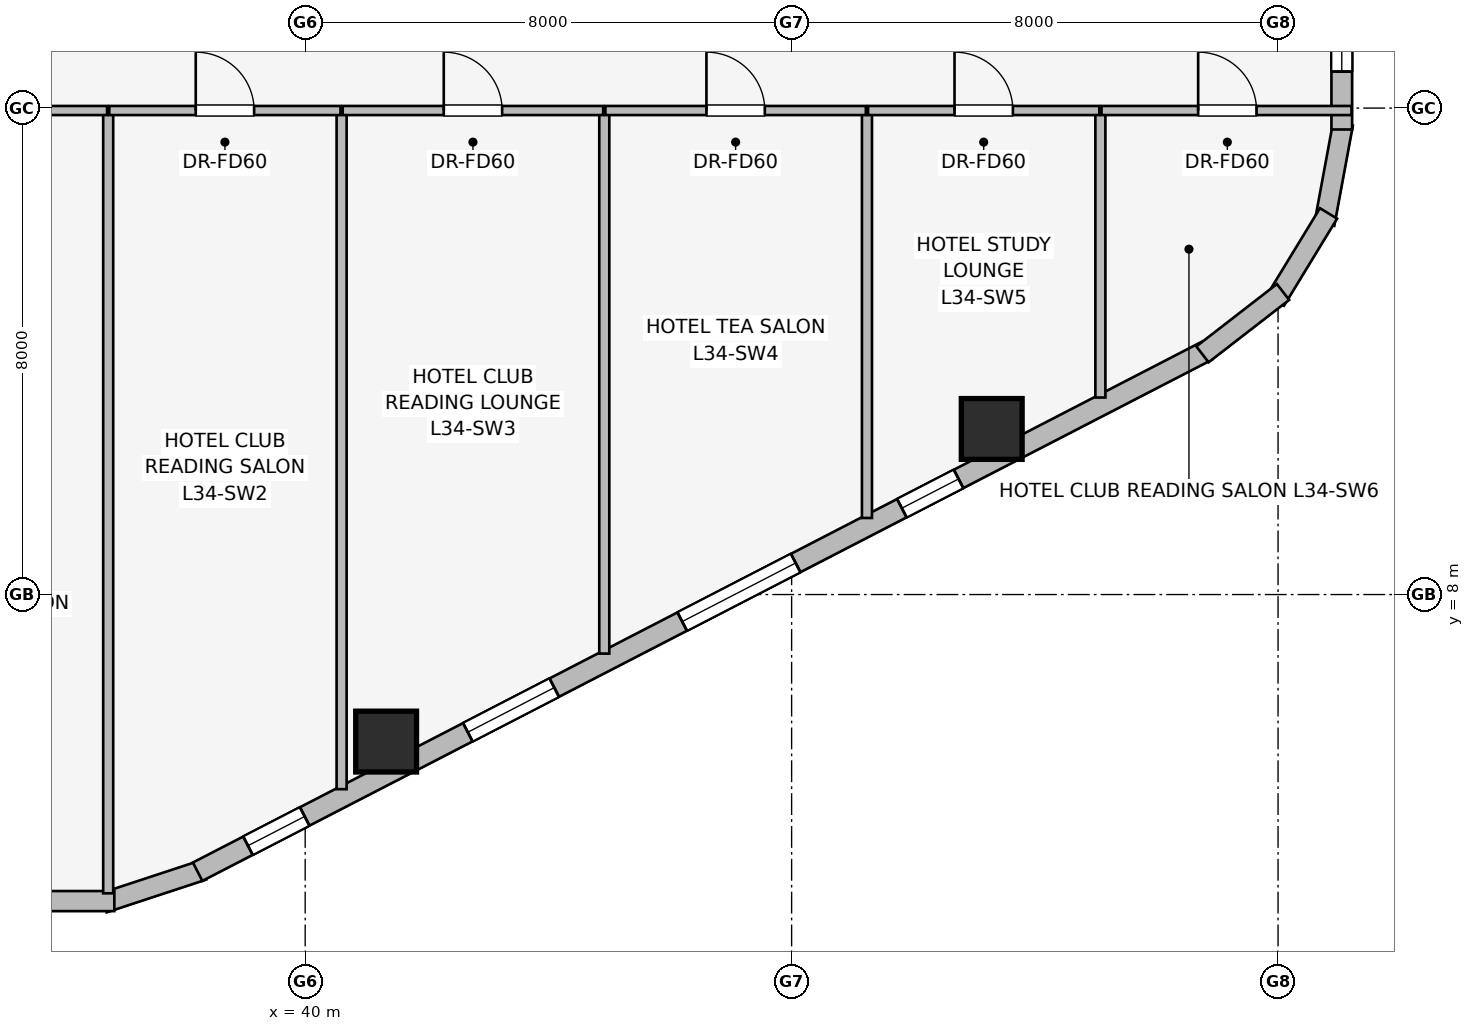
"""IFC4 building model, lengths in metres.
Left out: names, types, materials, properties, quantities, classifications, styles, units other than length and angle.
Written with IfcOpenShell. Run it as: python <this file> out.ifc"""

import sys

from ifc_helpers import new_model, si_unit, direction, frame, frame_2d, origin, origin_2d, place, context, subcontext, project, spatial, rectangle, extrude, element, fill, save


model = new_model("IFC4")
c1 = context("Model", 3, precision=1e-05, world=origin(), true_north=direction((0.0, 1.0)))
c2 = subcontext(c1, "Body", "Model", "MODEL_VIEW")
j1 = project(units=[si_unit("LENGTHUNIT", "METRE"), si_unit("PLANEANGLEUNIT", "RADIAN")], contexts=[c1])
p1 = place(None, origin())
s1 = spatial("IfcSite", under=j1, at=p1, CompositionType="ELEMENT")
p2 = place(p1, origin())
s2 = spatial("IfcBuilding", under=s1, at=p2, CompositionType="ELEMENT")
p3 = place(p2, frame((0.0, 0.0, 129.15)))
s3 = spatial("IfcBuildingStorey", under=s2, at=p3, CompositionType="ELEMENT", Elevation=129.15)
for number, where, z_axis, x_axis in (
    (1, (41.331, 5.582, 0.0), (0.0, 0.0, 1.0), (1.0, 0.0, 0.0)),
    (2, (51.291, 10.723, 0.0), (0.0, 0.0, 1.0), (1.0, 0.0, 0.0)),
):
    element("IfcColumn", number, at=place(p3, frame(where, z_axis=z_axis, x_axis=x_axis)), inside=s3, PredefinedType="COLUMN", context=c2, shape_type="SweptSolid", body=[
        extrude(rectangle(XDim=1.0, YDim=1.0, at=origin_2d()), origin(), (0.0, 0.0, 1.0), 3.45),
    ])
for number, where, z_axis, x_axis in (
    (3, (38.319, 3.468, 0.0), (0.0, 0.0, 1.0), (-0.95, -0.312, 0.0)),
    (4, (36.861, 2.959, 0.0), (0.0, 0.0, 1.0), (-1.0, 0.0, 0.0)),
):
    element("IfcWall", number, at=place(p3, frame(where, z_axis=z_axis, x_axis=x_axis)), inside=s3, PredefinedType="STANDARD", context=c2, shape_type="SweptSolid", body=[
        extrude(rectangle(XDim=1.722, YDim=0.33, at=frame_2d((0.861, 0.0))), origin(), (0.0, 0.0, 1.0), 3.19),
    ])
p4 = place(p3, frame((54.831, 12.01, 0.0), z_axis=(0.0, 0.0, 1.0), x_axis=(-0.888613612362, -0.458656568606, 0.0)))
e5 = element("IfcWall", 5, at=p4, inside=s3, PredefinedType="STANDARD", context=c2, shape_type="SweptSolid", body=[
    extrude(rectangle(XDim=18.681, YDim=0.34, at=frame_2d((9.34, 0.0))), origin(), (0.0, 0.0, 1.0), 3.19),
])
p5 = place(p4, frame((4.597, 0.0, 0.75)))
e6 = element("IfcOpeningElement", 6, at=p5, cuts=e5, PredefinedType="OPENING", context=c2, shape_type="SweptSolid", body=[
    extrude(rectangle(XDim=1.05, YDim=1.4, at=frame_2d((0.525, 0.7))), frame((0.0, 0.18, 0.0), z_axis=(0.0, -1.0, 0.0), x_axis=(1.0, 0.0, 0.0)), (0.0, 0.0, 1.0), 0.36),
])
p6 = place(p4, frame((7.612, 0.0, 0.75)))
e7 = element("IfcOpeningElement", 7, at=p6, cuts=e5, PredefinedType="OPENING", context=c2, shape_type="SweptSolid", body=[
    extrude(rectangle(XDim=2.1, YDim=1.5, at=frame_2d((1.05, 0.75))), frame((0.0, 0.18, 0.0), z_axis=(0.0, -1.0, 0.0), x_axis=(1.0, 0.0, 0.0)), (0.0, 0.0, 1.0), 0.36),
])
p7 = place(p4, frame((12.08, 0.0, 0.75)))
e8 = element("IfcOpeningElement", 8, at=p7, cuts=e5, PredefinedType="OPENING", context=c2, shape_type="SweptSolid", body=[
    extrude(rectangle(XDim=1.6, YDim=1.55, at=frame_2d((0.8, 0.775))), frame((0.0, 0.18, 0.0), z_axis=(0.0, -1.0, 0.0), x_axis=(1.0, 0.0, 0.0)), (0.0, 0.0, 1.0), 0.36),
])
p8 = place(p4, frame((16.699, 0.0, 0.75)))
e9 = element("IfcOpeningElement", 9, at=p8, cuts=e5, PredefinedType="OPENING", context=c2, shape_type="SweptSolid", body=[
    extrude(rectangle(XDim=1.05, YDim=1.4, at=frame_2d((0.525, 0.7))), frame((0.0, 0.18, 0.0), z_axis=(0.0, -1.0, 0.0), x_axis=(1.0, 0.0, 0.0)), (0.0, 0.0, 1.0), 0.36),
])
p9 = place(p3, frame((57.068, 15.742, 0.0), z_axis=(0.0, 0.0, 1.0), x_axis=(-0.181984991895, -0.983301308209, 0.0)))
e10 = element("IfcWall", 10, at=p9, inside=s3, PredefinedType="STANDARD", context=c2, shape_type="SweptSolid", body=[
    extrude(rectangle(XDim=1.677, YDim=0.33, at=frame_2d((0.838, 0.0))), origin(), (0.0, 0.0, 1.0), 3.19),
])
p10 = place(p3, frame((56.83, 14.268, 0.0), z_axis=(0.0, 0.0, 1.0), x_axis=(-0.520519429557, -0.853849824883, 0.0)))
e11 = element("IfcWall", 11, at=p10, inside=s3, PredefinedType="STANDARD", context=c2, shape_type="SweptSolid", body=[
    extrude(rectangle(XDim=1.677, YDim=0.33, at=frame_2d((0.839, 0.0))), origin(), (0.0, 0.0, 1.0), 3.19),
])
p11 = place(p3, frame((56.082, 12.976, 0.0), z_axis=(0.0, 0.0, 1.0), x_axis=(-0.790621329885, -0.612305408053, 0.0)))
e12 = element("IfcWall", 12, at=p11, inside=s3, PredefinedType="STANDARD", context=c2, shape_type="SweptSolid", body=[
    extrude(rectangle(XDim=1.676, YDim=0.33, at=frame_2d((0.838, 0.0))), origin(), (0.0, 0.0, 1.0), 3.19),
])
p12 = place(p3, frame((57.048, 32.352, 0.0), z_axis=(0.0, 0.0, 1.0), x_axis=(0.0, -1.0, 0.0)))
e13 = element("IfcWall", 13, at=p12, inside=s3, PredefinedType="STANDARD", context=c2, shape_type="SweptSolid", body=[
    extrude(rectangle(XDim=16.704, YDim=0.34, at=frame_2d((8.352, 0.0))), origin(), (0.0, 0.0, 1.0), 3.19),
])
p13 = place(p12, frame((0.992, 0.0, 0.75)))
e14 = element("IfcOpeningElement", 14, at=p13, cuts=e13, PredefinedType="OPENING", context=c2, shape_type="SweptSolid", body=[
    extrude(rectangle(XDim=1.05, YDim=1.4, at=frame_2d((0.525, 0.7))), frame((0.0, 0.18, 0.0), z_axis=(0.0, -1.0, 0.0), x_axis=(1.0, 0.0, 0.0)), (0.0, 0.0, 1.0), 0.36),
])
p14 = place(p12, frame((4.935, 0.0, 0.75)))
e15 = element("IfcOpeningElement", 15, at=p14, cuts=e13, PredefinedType="OPENING", context=c2, shape_type="SweptSolid", body=[
    extrude(rectangle(XDim=2.1, YDim=1.5, at=frame_2d((1.05, 0.75))), frame((0.0, 0.18, 0.0), z_axis=(0.0, -1.0, 0.0), x_axis=(1.0, 0.0, 0.0)), (0.0, 0.0, 1.0), 0.36),
])
p15 = place(p12, frame((9.919, 0.0, 0.75)))
e16 = element("IfcOpeningElement", 16, at=p15, cuts=e13, PredefinedType="OPENING", context=c2, shape_type="SweptSolid", body=[
    extrude(rectangle(XDim=1.6, YDim=1.55, at=frame_2d((0.8, 0.775))), frame((0.0, 0.18, 0.0), z_axis=(0.0, -1.0, 0.0), x_axis=(1.0, 0.0, 0.0)), (0.0, 0.0, 1.0), 0.36),
])
p16 = place(p12, frame((14.702, 0.0, 0.75)))
e17 = element("IfcOpeningElement", 17, at=p16, cuts=e13, PredefinedType="OPENING", context=c2, shape_type="SweptSolid", body=[
    extrude(rectangle(XDim=1.05, YDim=1.4, at=frame_2d((0.525, 0.7))), frame((0.0, 0.18, 0.0), z_axis=(0.0, -1.0, 0.0), x_axis=(1.0, 0.0, 0.0)), (0.0, 0.0, 1.0), 0.36),
])
p17 = place(p3, frame((36.76, 3.087, 0.0), z_axis=(0.0, 0.0, 1.0), x_axis=(0.0, 1.0, 0.0)))
e18 = element("IfcWall", 18, at=p17, inside=s3, PredefinedType="PARTITIONING", context=c2, shape_type="SweptSolid", body=[
    extrude(rectangle(XDim=12.843, YDim=0.165, at=frame_2d((6.421, 0.0))), origin(), (0.0, 0.0, 1.0), 3.19),
])
p18 = place(p3, frame((40.599, 4.799, 0.0), z_axis=(0.0, 0.0, 1.0), x_axis=(0.0, 1.0, 0.0)))
e19 = element("IfcWall", 19, at=p18, inside=s3, PredefinedType="PARTITIONING", context=c2, shape_type="SweptSolid", body=[
    extrude(rectangle(XDim=11.131, YDim=0.165, at=frame_2d((5.565, 0.0))), origin(), (0.0, 0.0, 1.0), 2.42),
])
p19 = place(p3, frame((44.919, 7.029, 0.0), z_axis=(0.0, 0.0, 1.0), x_axis=(0.0, 1.0, 0.0)))
e20 = element("IfcWall", 20, at=p19, inside=s3, PredefinedType="PARTITIONING", context=c2, shape_type="SweptSolid", body=[
    extrude(rectangle(XDim=8.901, YDim=0.165, at=frame_2d((4.45, 0.0))), origin(), (0.0, 0.0, 1.0), 3.19),
])
p20 = place(p3, frame((49.239, 9.259, 0.0), z_axis=(0.0, 0.0, 1.0), x_axis=(0.0, 1.0, 0.0)))
e21 = element("IfcWall", 21, at=p20, inside=s3, PredefinedType="PARTITIONING", context=c2, shape_type="SweptSolid", body=[
    extrude(rectangle(XDim=6.671, YDim=0.165, at=frame_2d((3.335, 0.0))), origin(), (0.0, 0.0, 1.0), 3.19),
])
p21 = place(p3, frame((53.078, 11.24, 0.0), z_axis=(0.0, 0.0, 1.0), x_axis=(0.0, 1.0, 0.0)))
e22 = element("IfcWall", 22, at=p21, inside=s3, PredefinedType="PARTITIONING", context=c2, shape_type="SweptSolid", body=[
    extrude(rectangle(XDim=4.69, YDim=0.165, at=frame_2d((2.345, 0.0))), origin(), (0.0, 0.0, 1.0), 3.19),
])
p22 = place(p3, frame((32.85, 15.96, 0.0), z_axis=(0.0, 0.0, 1.0), x_axis=(1.0, 0.0, 0.0)))
e23 = element("IfcWall", 23, at=p22, inside=s3, PredefinedType="PARTITIONING", context=c2, shape_type="SweptSolid", body=[
    extrude(rectangle(XDim=3.892, YDim=0.15, at=frame_2d((1.946, 0.0))), origin(), (0.0, 0.0, 1.0), 3.19),
])
p23 = place(p22, frame((1.466, 0.0, 0.0)))
e24 = element("IfcOpeningElement", 24, at=p23, cuts=e23, PredefinedType="OPENING", context=c2, shape_type="SweptSolid", body=[
    extrude(rectangle(XDim=0.96, YDim=2.0, at=frame_2d((0.48, 1.0))), frame((0.0, 0.085, 0.0), z_axis=(0.0, -1.0, 0.0), x_axis=(1.0, 0.0, 0.0)), (0.0, 0.0, 1.0), 0.17),
])
p24 = place(p3, frame((36.778, 15.96, 0.0), z_axis=(0.0, 0.0, 1.0), x_axis=(1.0, 0.0, 0.0)))
e25 = element("IfcWall", 25, at=p24, inside=s3, PredefinedType="PARTITIONING", context=c2, shape_type="SweptSolid", body=[
    extrude(rectangle(XDim=3.803, YDim=0.15, at=frame_2d((1.901, 0.0))), origin(), (0.0, 0.0, 1.0), 3.19),
])
p25 = place(p24, frame((1.422, 0.0, 0.0)))
e26 = element("IfcOpeningElement", 26, at=p25, cuts=e25, PredefinedType="OPENING", context=c2, shape_type="SweptSolid", body=[
    extrude(rectangle(XDim=0.96, YDim=2.0, at=frame_2d((0.48, 1.0))), frame((0.0, 0.085, 0.0), z_axis=(0.0, -1.0, 0.0), x_axis=(1.0, 0.0, 0.0)), (0.0, 0.0, 1.0), 0.17),
])
p26 = place(p3, frame((40.617, 15.96, 0.0), z_axis=(0.0, 0.0, 1.0), x_axis=(1.0, 0.0, 0.0)))
e27 = element("IfcWall", 27, at=p26, inside=s3, PredefinedType="PARTITIONING", context=c2, shape_type="SweptSolid", body=[
    extrude(rectangle(XDim=4.284, YDim=0.15, at=frame_2d((2.142, 0.0))), origin(), (0.0, 0.0, 1.0), 3.19),
])
p27 = place(p26, frame((1.662, 0.0, 0.0)))
e28 = element("IfcOpeningElement", 28, at=p27, cuts=e27, PredefinedType="OPENING", context=c2, shape_type="SweptSolid", body=[
    extrude(rectangle(XDim=0.96, YDim=2.0, at=frame_2d((0.48, 1.0))), frame((0.0, 0.085, 0.0), z_axis=(0.0, -1.0, 0.0), x_axis=(1.0, 0.0, 0.0)), (0.0, 0.0, 1.0), 0.17),
])
p28 = place(p3, frame((44.937, 15.96, 0.0), z_axis=(0.0, 0.0, 1.0), x_axis=(1.0, 0.0, 0.0)))
e29 = element("IfcWall", 29, at=p28, inside=s3, PredefinedType="PARTITIONING", context=c2, shape_type="SweptSolid", body=[
    extrude(rectangle(XDim=4.284, YDim=0.15, at=frame_2d((2.142, 0.0))), origin(), (0.0, 0.0, 1.0), 3.19),
])
p29 = place(p28, frame((1.662, 0.0, 0.0)))
e30 = element("IfcOpeningElement", 30, at=p29, cuts=e29, PredefinedType="OPENING", context=c2, shape_type="SweptSolid", body=[
    extrude(rectangle(XDim=0.96, YDim=2.0, at=frame_2d((0.48, 1.0))), frame((0.0, 0.085, 0.0), z_axis=(0.0, -1.0, 0.0), x_axis=(1.0, 0.0, 0.0)), (0.0, 0.0, 1.0), 0.17),
])
p30 = place(p3, frame((49.257, 15.96, 0.0), z_axis=(0.0, 0.0, 1.0), x_axis=(1.0, 0.0, 0.0)))
e31 = element("IfcWall", 31, at=p30, inside=s3, PredefinedType="PARTITIONING", context=c2, shape_type="SweptSolid", body=[
    extrude(rectangle(XDim=3.803, YDim=0.15, at=frame_2d((1.901, 0.0))), origin(), (0.0, 0.0, 1.0), 3.19),
])
p31 = place(p30, frame((1.422, 0.0, 0.0)))
e32 = element("IfcOpeningElement", 32, at=p31, cuts=e31, PredefinedType="OPENING", context=c2, shape_type="SweptSolid", body=[
    extrude(rectangle(XDim=0.96, YDim=2.0, at=frame_2d((0.48, 1.0))), frame((0.0, 0.085, 0.0), z_axis=(0.0, -1.0, 0.0), x_axis=(1.0, 0.0, 0.0)), (0.0, 0.0, 1.0), 0.17),
])
p32 = place(p3, frame((53.096, 15.96, 0.0), z_axis=(0.0, 0.0, 1.0), x_axis=(1.0, 0.0, 0.0)))
e33 = element("IfcWall", 33, at=p32, inside=s3, PredefinedType="PARTITIONING", context=c2, shape_type="SweptSolid", body=[
    extrude(rectangle(XDim=4.112, YDim=0.15, at=frame_2d((2.056, 0.0))), origin(), (0.0, 0.0, 1.0), 3.19),
])
p33 = place(p32, frame((1.59, 0.0, 0.0)))
e34 = element("IfcOpeningElement", 34, at=p33, cuts=e33, PredefinedType="OPENING", context=c2, shape_type="SweptSolid", body=[
    extrude(rectangle(XDim=0.96, YDim=2.0, at=frame_2d((0.48, 1.0))), frame((0.0, 0.085, 0.0), z_axis=(0.0, -1.0, 0.0), x_axis=(1.0, 0.0, 0.0)), (0.0, 0.0, 1.0), 0.17),
])
p34 = place(p5, origin())
e35 = element("IfcWindow", 35, at=p34, inside=s3, PartitioningType="SINGLE_PANEL", PredefinedType="WINDOW", context=c2, shape_type="SweptSolid", body=[
    extrude(rectangle(XDim=1.05, YDim=1.4, at=frame_2d((0.525, 0.7))), frame((0.0, 0.03, 0.0), z_axis=(0.0, -1.0, 0.0), x_axis=(1.0, 0.0, 0.0)), (0.0, 0.0, 1.0), 0.06),
])
fill(e6, e35)
p35 = place(p6, origin())
e36 = element("IfcWindow", 36, at=p35, inside=s3, PartitioningType="SINGLE_PANEL", PredefinedType="WINDOW", context=c2, shape_type="SweptSolid", body=[
    extrude(rectangle(XDim=2.1, YDim=1.5, at=frame_2d((1.05, 0.75))), frame((0.0, 0.03, 0.0), z_axis=(0.0, -1.0, 0.0), x_axis=(1.0, 0.0, 0.0)), (0.0, 0.0, 1.0), 0.06),
])
fill(e7, e36)
p36 = place(p7, origin())
e37 = element("IfcWindow", 37, at=p36, inside=s3, PartitioningType="SINGLE_PANEL", PredefinedType="WINDOW", context=c2, shape_type="SweptSolid", body=[
    extrude(rectangle(XDim=1.6, YDim=1.55, at=frame_2d((0.8, 0.775))), frame((0.0, 0.03, 0.0), z_axis=(0.0, -1.0, 0.0), x_axis=(1.0, 0.0, 0.0)), (0.0, 0.0, 1.0), 0.06),
])
fill(e8, e37)
p37 = place(p8, origin())
e38 = element("IfcWindow", 38, at=p37, inside=s3, PartitioningType="SINGLE_PANEL", PredefinedType="WINDOW", context=c2, shape_type="SweptSolid", body=[
    extrude(rectangle(XDim=1.05, YDim=1.4, at=frame_2d((0.525, 0.7))), frame((0.0, 0.03, 0.0), z_axis=(0.0, -1.0, 0.0), x_axis=(1.0, 0.0, 0.0)), (0.0, 0.0, 1.0), 0.06),
])
fill(e9, e38)
p38 = place(p16, origin())
e39 = element("IfcWindow", 39, at=p38, inside=s3, PartitioningType="SINGLE_PANEL", PredefinedType="WINDOW", context=c2, shape_type="SweptSolid", body=[
    extrude(rectangle(XDim=1.05, YDim=1.4, at=frame_2d((0.525, 0.7))), frame((0.0, 0.03, 0.0), z_axis=(0.0, -1.0, 0.0), x_axis=(1.0, 0.0, 0.0)), (0.0, 0.0, 1.0), 0.06),
])
fill(e17, e39)
p39 = place(p25, origin())
e40 = element("IfcDoor", 40, at=p39, inside=s3, OperationType="SINGLE_SWING_LEFT", PredefinedType="DOOR", context=c2, shape_type="SweptSolid", body=[
    extrude(rectangle(XDim=0.96, YDim=2.0, at=frame_2d((0.48, 1.0))), frame((0.0, 0.025, 0.0), z_axis=(0.0, -1.0, 0.0), x_axis=(1.0, 0.0, 0.0)), (0.0, 0.0, 1.0), 0.05),
])
fill(e26, e40)
p40 = place(p27, origin())
e41 = element("IfcDoor", 41, at=p40, inside=s3, OperationType="SINGLE_SWING_LEFT", PredefinedType="DOOR", context=c2, shape_type="SweptSolid", body=[
    extrude(rectangle(XDim=0.96, YDim=2.0, at=frame_2d((0.48, 1.0))), frame((0.0, 0.025, 0.0), z_axis=(0.0, -1.0, 0.0), x_axis=(1.0, 0.0, 0.0)), (0.0, 0.0, 1.0), 0.05),
])
fill(e28, e41)
p41 = place(p29, origin())
e42 = element("IfcDoor", 42, at=p41, inside=s3, OperationType="SINGLE_SWING_LEFT", PredefinedType="DOOR", context=c2, shape_type="SweptSolid", body=[
    extrude(rectangle(XDim=0.96, YDim=2.0, at=frame_2d((0.48, 1.0))), frame((0.0, 0.025, 0.0), z_axis=(0.0, -1.0, 0.0), x_axis=(1.0, 0.0, 0.0)), (0.0, 0.0, 1.0), 0.05),
])
fill(e30, e42)
p42 = place(p31, origin())
e43 = element("IfcDoor", 43, at=p42, inside=s3, OperationType="SINGLE_SWING_LEFT", PredefinedType="DOOR", context=c2, shape_type="SweptSolid", body=[
    extrude(rectangle(XDim=0.96, YDim=2.0, at=frame_2d((0.48, 1.0))), frame((0.0, 0.025, 0.0), z_axis=(0.0, -1.0, 0.0), x_axis=(1.0, 0.0, 0.0)), (0.0, 0.0, 1.0), 0.05),
])
fill(e32, e43)
p43 = place(p33, origin())
e44 = element("IfcDoor", 44, at=p43, inside=s3, OperationType="SINGLE_SWING_LEFT", PredefinedType="DOOR", context=c2, shape_type="SweptSolid", body=[
    extrude(rectangle(XDim=0.96, YDim=2.0, at=frame_2d((0.48, 1.0))), frame((0.0, 0.025, 0.0), z_axis=(0.0, -1.0, 0.0), x_axis=(1.0, 0.0, 0.0)), (0.0, 0.0, 1.0), 0.05),
])
fill(e34, e44)
save(model, sys.argv[1])
